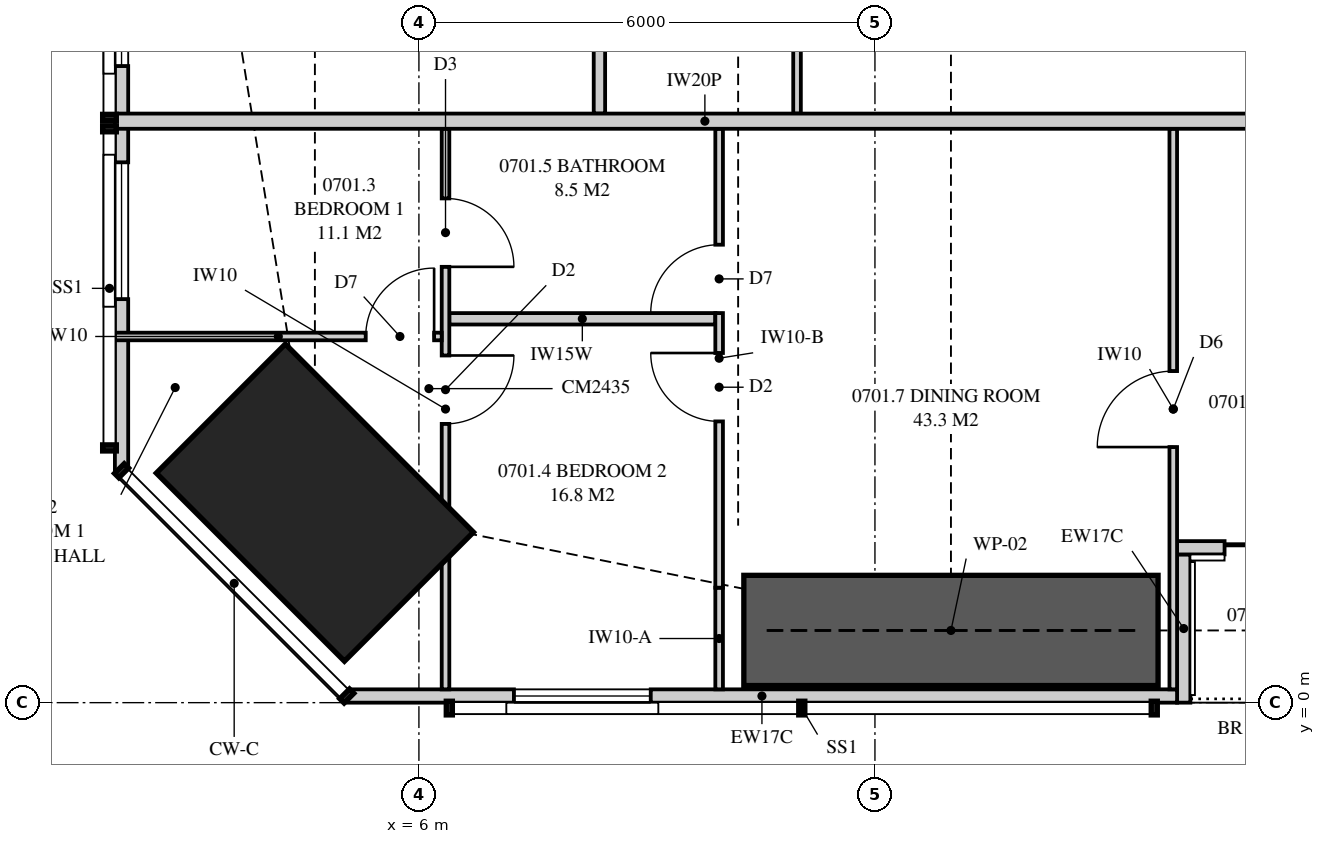
"""IFC4 building model, lengths in metres.
Left out: names, types, materials, properties, quantities, classifications, styles, units other than length and angle.
Written with IfcOpenShell. Run it as: python <this file> out.ifc"""

import sys

from ifc_helpers import new_model, si_unit, direction, frame, frame_2d, origin, origin_2d, place, context, subcontext, project, spatial, polyline, rectangle, outline, extrude, element, fill, save


model = new_model("IFC4")
c1 = context("Model", 3, precision=1e-05, world=origin(), true_north=direction((0.0, 1.0)))
c2 = subcontext(c1, "Body", "Model", "MODEL_VIEW")
j1 = project(units=[si_unit("LENGTHUNIT", "METRE"), si_unit("PLANEANGLEUNIT", "RADIAN")], contexts=[c1])
p1 = place(None, origin())
s1 = spatial("IfcSite", under=j1, at=p1, CompositionType="ELEMENT")
p2 = place(p1, origin())
s2 = spatial("IfcBuilding", under=s1, at=p2, CompositionType="ELEMENT")
p3 = place(p2, frame((0.0, 0.0, 31.05)))
s3 = spatial("IfcBuildingStorey", under=s2, at=p3, CompositionType="ELEMENT", Elevation=31.05)
p4 = place(p3, frame((4.631, 2.631, 0.0), z_axis=(0.0, 0.0, 1.0), x_axis=(0.707106781187, 0.707106781187, 0.0)))
e1 = element("IfcColumn", 1, at=p4, inside=s3, PredefinedType="COLUMN", context=c2, shape_type="SweptSolid", body=[
    extrude(rectangle(XDim=2.4, YDim=3.5, at=origin_2d()), origin(), (0.0, 0.0, 1.0), 3.35),
])
p5 = place(p3, frame((5.051, 0.087, 0.0), z_axis=(0.0, 0.0, 1.0), x_axis=(1.0, 0.0, 0.0)))
e2 = element("IfcWall", 2, at=p5, inside=s3, PredefinedType="SOLIDWALL", context=c2, shape_type="SweptSolid", body=[
    extrude(outline(polyline([(0.0, 0.0), (10.924, 0.0), (10.924, 2.15), (7.949, 2.15), (7.949, 3.11), (7.793, 3.11), (7.793, 2.15), (7.745, 2.15), (7.745, 3.11), (0.0, 3.11), (0.0, 0.0)])), frame((0.0, 0.087, 0.0), z_axis=(0.0, -1.0, 0.0), x_axis=(1.0, 0.0, 0.0)), (0.0, 0.0, 1.0), 0.175),
])
p6 = place(p5, frame((2.199, 0.0, 0.4)))
e3 = element("IfcOpeningElement", 3, at=p6, cuts=e2, PredefinedType="OPENING", context=c2, shape_type="SweptSolid", body=[
    extrude(rectangle(XDim=1.8, YDim=1.7, at=frame_2d((0.9, 0.85))), frame((0.0, 0.097, 0.0), z_axis=(0.0, -1.0, 0.0), x_axis=(1.0, 0.0, 0.0)), (0.0, 0.0, 1.0), 0.195),
])
p7 = place(p3, frame((15.975, 2.038, 0.0), z_axis=(0.0, 0.0, 1.0), x_axis=(1.0, 0.0, 0.0)))
e4 = element("IfcWall", 4, at=p7, inside=s3, PredefinedType="SOLIDWALL", context=c2, shape_type="SweptSolid", body=[
    extrude(rectangle(XDim=3.05, YDim=0.175, at=frame_2d((1.525, 0.0))), origin(), (0.0, 0.0, 1.0), 3.11),
])
p8 = place(p7, frame((0.625, 0.0, 0.0)))
e5 = element("IfcOpeningElement", 5, at=p8, cuts=e4, PredefinedType="OPENING", context=c2, shape_type="SweptSolid", body=[
    extrude(rectangle(XDim=1.8, YDim=2.1, at=frame_2d((0.9, 1.05))), frame((0.0, 0.097, 0.0), z_axis=(0.0, -1.0, 0.0), x_axis=(1.0, 0.0, 0.0)), (0.0, 0.0, 1.0), 0.195),
])
p9 = place(p3, frame((16.062, 0.0, 0.0), z_axis=(0.0, 0.0, 1.0), x_axis=(0.0, 1.0, 0.0)))
e6 = element("IfcWall", 6, at=p9, inside=s3, PredefinedType="SOLIDWALL", context=c2, shape_type="SweptSolid", body=[
    extrude(outline(polyline([(0.0, 0.0), (1.95, 0.0), (1.95, 3.11), (1.75, 3.11), (1.75, 2.15), (0.15, 2.15), (0.15, 3.11), (0.0, 3.11), (0.0, 0.0)])), frame((0.0, 0.087, 0.0), z_axis=(0.0, -1.0, 0.0), x_axis=(1.0, 0.0, 0.0)), (0.0, 0.0, 1.0), 0.175),
])
p10 = place(p3, frame((2.087, 17.333, 0.0), z_axis=(0.0, 0.0, 1.0), x_axis=(0.0, -1.0, 0.0)))
e7 = element("IfcWall", 7, at=p10, inside=s3, PredefinedType="SOLIDWALL", context=c2, shape_type="SweptSolid", body=[
    extrude(outline(polyline([(0.0, 0.0), (14.282, 0.0), (14.282, 3.11), (4.552, 3.11), (4.552, 2.15), (4.459, 2.15), (4.459, 3.11), (4.333, 3.11), (4.333, 2.15), (0.0, 2.15), (0.0, 0.0)])), frame((0.0, 0.087, 0.0), z_axis=(0.0, -1.0, 0.0), x_axis=(1.0, 0.0, 0.0)), (0.0, 0.0, 1.0), 0.175),
])
p11 = place(p10, frame((0.3, 0.0, 0.4)))
e8 = element("IfcOpeningElement", 8, at=p11, cuts=e7, PredefinedType="OPENING", context=c2, shape_type="SweptSolid", body=[
    extrude(rectangle(XDim=1.2, YDim=1.7, at=frame_2d((0.6, 0.85))), frame((0.0, 0.097, 0.0), z_axis=(0.0, -1.0, 0.0), x_axis=(1.0, 0.0, 0.0)), (0.0, 0.0, 1.0), 0.195),
])
p12 = place(p10, frame((7.158, 0.0, 0.4)))
e9 = element("IfcOpeningElement", 9, at=p12, cuts=e7, PredefinedType="OPENING", context=c2, shape_type="SweptSolid", body=[
    extrude(rectangle(XDim=1.8, YDim=1.7, at=frame_2d((0.9, 0.85))), frame((0.0, 0.097, 0.0), z_axis=(0.0, -1.0, 0.0), x_axis=(1.0, 0.0, 0.0)), (0.0, 0.0, 1.0), 0.195),
])
p13 = place(p10, frame((10.225, 0.0, 0.4)))
e10 = element("IfcOpeningElement", 10, at=p13, cuts=e7, PredefinedType="OPENING", context=c2, shape_type="SweptSolid", body=[
    extrude(rectangle(XDim=1.8, YDim=1.7, at=frame_2d((0.9, 0.85))), frame((0.0, 0.097, 0.0), z_axis=(0.0, -1.0, 0.0), x_axis=(1.0, 0.0, 0.0)), (0.0, 0.0, 1.0), 0.195),
])
p14 = place(p3, frame((6.35, 0.175, 0.0), z_axis=(0.0, 0.0, 1.0), x_axis=(0.0, 1.0, 0.0)))
e11 = element("IfcWall", 11, at=p14, inside=s3, PredefinedType="PARTITIONING", context=c2, shape_type="SweptSolid", body=[
    extrude(outline(polyline([(0.0, 0.0), (7.375, 0.0), (7.375, 3.11), (2.988, 3.11), (2.988, 2.15), (1.234, 2.15), (1.234, 3.11), (0.0, 3.11), (0.0, 0.0)])), frame((0.0, 0.05, 0.0), z_axis=(0.0, -1.0, 0.0), x_axis=(1.0, 0.0, 0.0)), (0.0, 0.0, 1.0), 0.1),
])
p15 = place(p14, frame((3.492, 0.0, 0.0)))
e12 = element("IfcOpeningElement", 12, at=p15, cuts=e11, PredefinedType="OPENING", context=c2, shape_type="SweptSolid", body=[
    extrude(rectangle(XDim=0.9, YDim=2.1, at=frame_2d((0.45, 1.05))), frame((0.0, 0.06, 0.0), z_axis=(0.0, -1.0, 0.0), x_axis=(1.0, 0.0, 0.0)), (0.0, 0.0, 1.0), 0.12),
])
p16 = place(p14, frame((5.559, 0.0, 0.0)))
e13 = element("IfcOpeningElement", 13, at=p16, cuts=e11, PredefinedType="OPENING", context=c2, shape_type="SweptSolid", body=[
    extrude(rectangle(XDim=0.9, YDim=2.1, at=frame_2d((0.45, 1.05))), frame((0.0, 0.06, 0.0), z_axis=(0.0, -1.0, 0.0), x_axis=(1.0, 0.0, 0.0)), (0.0, 0.0, 1.0), 0.12),
])
p17 = place(p3, frame((9.95, 0.175, 0.0), z_axis=(0.0, 0.0, 1.0), x_axis=(0.0, 1.0, 0.0)))
e14 = element("IfcWall", 14, at=p17, inside=s3, PredefinedType="PARTITIONING", context=c2, shape_type="SweptSolid", body=[
    extrude(outline(polyline([(0.0, 0.0), (1.338, 0.0), (1.338, 2.15), (0.51, 2.15), (0.51, 3.11), (0.0, 3.11), (0.0, 0.0)])), frame((0.0, 0.05, 0.0), z_axis=(0.0, -1.0, 0.0), x_axis=(1.0, 0.0, 0.0)), (0.0, 0.0, 1.0), 0.1),
])
p18 = place(p3, frame((9.95, 1.513, 0.0), z_axis=(0.0, 0.0, 1.0), x_axis=(0.0, 1.0, 0.0)))
e15 = element("IfcWall", 15, at=p18, inside=s3, PredefinedType="PARTITIONING", context=c2, shape_type="SweptSolid", body=[
    extrude(outline(polyline([(0.0, 0.0), (6.037, 0.0), (6.037, 2.51), (0.927, 2.51), (0.927, 2.15), (0.0, 2.15), (0.0, 0.0)])), frame((0.0, 0.05, 0.0), z_axis=(0.0, -1.0, 0.0), x_axis=(1.0, 0.0, 0.0)), (0.0, 0.0, 1.0), 0.1),
])
p19 = place(p18, frame((2.188, 0.0, 0.0)))
e16 = element("IfcOpeningElement", 16, at=p19, cuts=e15, PredefinedType="OPENING", context=c2, shape_type="SweptSolid", body=[
    extrude(rectangle(XDim=0.9, YDim=2.1, at=frame_2d((0.45, 1.05))), frame((0.0, 0.06, 0.0), z_axis=(0.0, -1.0, 0.0), x_axis=(1.0, 0.0, 0.0)), (0.0, 0.0, 1.0), 0.12),
])
p20 = place(p18, frame((3.612, 0.0, 0.0)))
e17 = element("IfcOpeningElement", 17, at=p20, cuts=e15, PredefinedType="OPENING", context=c2, shape_type="SweptSolid", body=[
    extrude(rectangle(XDim=0.9, YDim=2.1, at=frame_2d((0.45, 1.05))), frame((0.0, 0.06, 0.0), z_axis=(0.0, -1.0, 0.0), x_axis=(1.0, 0.0, 0.0)), (0.0, 0.0, 1.0), 0.12),
])
p21 = place(p3, frame((2.0, 4.817, 0.0), z_axis=(0.0, 0.0, 1.0), x_axis=(1.0, 0.0, 0.0)))
e18 = element("IfcWall", 18, at=p21, inside=s3, PredefinedType="PARTITIONING", context=c2, shape_type="SweptSolid", body=[
    extrude(outline(polyline([(0.0, 0.0), (4.3, 0.0), (4.3, 3.11), (3.148, 3.11), (3.148, 2.15), (1.406, 2.15), (1.406, 3.11), (0.0, 3.11), (0.0, 0.0)])), frame((0.0, 0.05, 0.0), z_axis=(0.0, -1.0, 0.0), x_axis=(1.0, 0.0, 0.0)), (0.0, 0.0, 1.0), 0.1),
])
p22 = place(p21, frame((3.3, 0.0, 0.0)))
e19 = element("IfcOpeningElement", 19, at=p22, cuts=e18, PredefinedType="OPENING", context=c2, shape_type="SweptSolid", body=[
    extrude(rectangle(XDim=0.9, YDim=2.1, at=frame_2d((0.45, 1.05))), frame((0.0, 0.06, 0.0), z_axis=(0.0, -1.0, 0.0), x_axis=(1.0, 0.0, 0.0)), (0.0, 0.0, 1.0), 0.12),
])
p23 = place(p3, frame((6.4, 5.05, 0.0), z_axis=(0.0, 0.0, 1.0), x_axis=(1.0, 0.0, 0.0)))
e20 = element("IfcWall", 20, at=p23, inside=s3, PredefinedType="PLUMBINGWALL", context=c2, shape_type="SweptSolid", body=[
    extrude(outline(polyline([(0.0, 0.0), (3.5, 0.0), (3.5, 3.11), (3.5, 2.51), (2.515, 2.51), (2.515, 3.11), (0.0, 3.11), (0.0, 0.0)])), frame((0.0, 0.075, 0.0), z_axis=(0.0, -1.0, 0.0), x_axis=(1.0, 0.0, 0.0)), (0.0, 0.0, 1.0), 0.15),
])
p24 = place(p3, frame((15.925, 0.175, 0.0), z_axis=(0.0, 0.0, 1.0), x_axis=(0.0, 1.0, 0.0)))
e21 = element("IfcWall", 21, at=p24, inside=s3, PredefinedType="PARTITIONING", context=c2, shape_type="SweptSolid", body=[
    extrude(outline(polyline([(0.0, 0.0), (7.375, 0.0), (7.375, 3.11), (1.635, 3.11), (1.635, 2.15), (0.0, 2.15), (0.0, 3.11), (0.0, 0.0)])), frame((0.0, 0.05, 0.0), z_axis=(0.0, -1.0, 0.0), x_axis=(1.0, 0.0, 0.0)), (0.0, 0.0, 1.0), 0.1),
])
p25 = place(p24, frame((3.188, 0.0, 0.0)))
e22 = element("IfcOpeningElement", 22, at=p25, cuts=e21, PredefinedType="OPENING", context=c2, shape_type="SweptSolid", body=[
    extrude(rectangle(XDim=1.0, YDim=2.1, at=frame_2d((0.5, 1.05))), frame((0.0, 0.06, 0.0), z_axis=(0.0, -1.0, 0.0), x_axis=(1.0, 0.0, 0.0)), (0.0, 0.0, 1.0), 0.12),
])
p26 = place(p3, frame((2.0, 7.65, 0.0), z_axis=(0.0, 0.0, 1.0), x_axis=(1.0, 0.0, 0.0)))
e23 = element("IfcWall", 23, at=p26, inside=s3, PredefinedType="PARTITIONING", context=c2, shape_type="SweptSolid", body=[
    extrude(outline(polyline([(0.0, 0.0), (15.525, 0.0), (15.525, 3.11), (11.337, 3.11), (11.337, 2.541), (10.663, 2.541), (10.663, 3.11), (9.51, 3.11), (9.51, 2.51), (6.89, 2.51), (6.89, 3.11), (2.969, 3.11), (2.969, 2.541), (2.74, 2.541), (2.74, 2.15), (0.896, 2.15), (0.896, 3.11), (0.0, 3.11), (0.0, 0.0)])), frame((0.0, 0.1, 0.0), z_axis=(0.0, -1.0, 0.0), x_axis=(1.0, 0.0, 0.0)), (0.0, 0.0, 1.0), 0.2),
])
p27 = place(p3, frame((8.375, 7.75, 0.0), z_axis=(0.0, 0.0, 1.0), x_axis=(0.0, 1.0, 0.0)))
e24 = element("IfcWall", 24, at=p27, inside=s3, PredefinedType="PLUMBINGWALL", context=c2, shape_type="SweptSolid", body=[
    extrude(rectangle(XDim=3.45, YDim=0.15, at=frame_2d((1.725, 0.0))), origin(), (0.0, 0.0, 1.0), 3.11),
])
p28 = place(p3, frame((10.975, 7.75, 0.0), z_axis=(0.0, 0.0, 1.0), x_axis=(0.0, 1.0, 0.0)))
e25 = element("IfcWall", 25, at=p28, inside=s3, PredefinedType="PARTITIONING", context=c2, shape_type="SweptSolid", body=[
    extrude(outline(polyline([(0.0, 0.0), (3.45, 0.0), (3.45, 3.11), (3.45, 2.51), (0.0, 2.51), (0.0, 3.11), (0.0, 0.0)])), frame((0.0, 0.05, 0.0), z_axis=(0.0, -1.0, 0.0), x_axis=(1.0, 0.0, 0.0)), (0.0, 0.0, 1.0), 0.1),
])
p29 = place(p3, frame((10.275, 0.95, 0.0), z_axis=(0.0, 0.0, 1.0), x_axis=(1.0, 0.0, 0.0)))
e26 = element("IfcWall", 26, at=p29, inside=s3, PredefinedType="SHEAR", context=c2, shape_type="SweptSolid", body=[
    extrude(rectangle(XDim=5.45, YDim=1.45, at=frame_2d((2.725, 0.0))), origin(), (0.0, 0.0, 1.0), 3.35),
])
p30 = place(p6, origin())
e27 = element("IfcWindow", 27, at=p30, inside=s3, PartitioningType="SINGLE_PANEL", PredefinedType="WINDOW", context=c2, shape_type="SweptSolid", body=[
    extrude(rectangle(XDim=1.8, YDim=1.7, at=frame_2d((0.9, 0.85))), frame((0.0, 0.03, 0.0), z_axis=(0.0, -1.0, 0.0), x_axis=(1.0, 0.0, 0.0)), (0.0, 0.0, 1.0), 0.06),
])
fill(e3, e27)
p31 = place(p8, origin())
e28 = element("IfcDoor", 28, at=p31, inside=s3, OperationType="SLIDING_TO_LEFT", PredefinedType="DOOR", context=c2, shape_type="SweptSolid", body=[
    extrude(rectangle(XDim=1.8, YDim=2.1, at=frame_2d((0.9, 1.05))), frame((0.0, 0.025, 0.0), z_axis=(0.0, -1.0, 0.0), x_axis=(1.0, 0.0, 0.0)), (0.0, 0.0, 1.0), 0.05),
])
fill(e5, e28)
p32 = place(p12, origin())
e29 = element("IfcWindow", 29, at=p32, inside=s3, PartitioningType="SINGLE_PANEL", PredefinedType="WINDOW", context=c2, shape_type="SweptSolid", body=[
    extrude(rectangle(XDim=1.8, YDim=1.7, at=frame_2d((0.9, 0.85))), frame((0.0, 0.03, 0.0), z_axis=(0.0, -1.0, 0.0), x_axis=(1.0, 0.0, 0.0)), (0.0, 0.0, 1.0), 0.06),
])
fill(e9, e29)
p33 = place(p13, origin())
e30 = element("IfcWindow", 30, at=p33, inside=s3, PartitioningType="SINGLE_PANEL", PredefinedType="WINDOW", context=c2, shape_type="SweptSolid", body=[
    extrude(rectangle(XDim=1.8, YDim=1.7, at=frame_2d((0.9, 0.85))), frame((0.0, 0.03, 0.0), z_axis=(0.0, -1.0, 0.0), x_axis=(1.0, 0.0, 0.0)), (0.0, 0.0, 1.0), 0.06),
])
fill(e10, e30)
p34 = place(p22, origin())
e31 = element("IfcDoor", 31, at=p34, inside=s3, OperationType="SINGLE_SWING_RIGHT", PredefinedType="DOOR", context=c2, shape_type="SweptSolid", body=[
    extrude(rectangle(XDim=0.9, YDim=2.1, at=frame_2d((0.45, 1.05))), frame((0.0, 0.025, 0.0), z_axis=(0.0, -1.0, 0.0), x_axis=(1.0, 0.0, 0.0)), (0.0, 0.0, 1.0), 0.05),
])
fill(e19, e31)
p35 = place(p15, frame((0.9, 0.0, 0.0), z_axis=(0.0, 0.0, 1.0), x_axis=(-1.0, 0.0, 0.0)))
e32 = element("IfcDoor", 32, at=p35, inside=s3, OperationType="SINGLE_SWING_LEFT", PredefinedType="DOOR", context=c2, shape_type="SweptSolid", body=[
    extrude(rectangle(XDim=0.9, YDim=2.1, at=frame_2d((0.45, 1.05))), frame((0.0, 0.025, 0.0), z_axis=(0.0, -1.0, 0.0), x_axis=(1.0, 0.0, 0.0)), (0.0, 0.0, 1.0), 0.05),
])
fill(e12, e32)
p36 = place(p19, origin())
e33 = element("IfcDoor", 33, at=p36, inside=s3, OperationType="SINGLE_SWING_RIGHT", PredefinedType="DOOR", context=c2, shape_type="SweptSolid", body=[
    extrude(rectangle(XDim=0.9, YDim=2.1, at=frame_2d((0.45, 1.05))), frame((0.0, 0.025, 0.0), z_axis=(0.0, -1.0, 0.0), x_axis=(1.0, 0.0, 0.0)), (0.0, 0.0, 1.0), 0.05),
])
fill(e16, e33)
p37 = place(p20, origin())
e34 = element("IfcDoor", 34, at=p37, inside=s3, OperationType="SINGLE_SWING_LEFT", PredefinedType="DOOR", context=c2, shape_type="SweptSolid", body=[
    extrude(rectangle(XDim=0.9, YDim=2.1, at=frame_2d((0.45, 1.05))), frame((0.0, 0.025, 0.0), z_axis=(0.0, -1.0, 0.0), x_axis=(1.0, 0.0, 0.0)), (0.0, 0.0, 1.0), 0.05),
])
fill(e17, e34)
p38 = place(p16, frame((0.9, 0.0, 0.0), z_axis=(0.0, 0.0, 1.0), x_axis=(-1.0, 0.0, 0.0)))
e35 = element("IfcDoor", 35, at=p38, inside=s3, OperationType="SINGLE_SWING_RIGHT", PredefinedType="DOOR", context=c2, shape_type="SweptSolid", body=[
    extrude(rectangle(XDim=0.9, YDim=2.1, at=frame_2d((0.45, 1.05))), frame((0.0, 0.025, 0.0), z_axis=(0.0, -1.0, 0.0), x_axis=(1.0, 0.0, 0.0)), (0.0, 0.0, 1.0), 0.05),
])
fill(e13, e35)
p39 = place(p25, origin())
e36 = element("IfcDoor", 36, at=p39, inside=s3, OperationType="SINGLE_SWING_LEFT", PredefinedType="DOOR", context=c2, shape_type="SweptSolid", body=[
    extrude(rectangle(XDim=1.0, YDim=2.1, at=frame_2d((0.5, 1.05))), frame((0.0, 0.025, 0.0), z_axis=(0.0, -1.0, 0.0), x_axis=(1.0, 0.0, 0.0)), (0.0, 0.0, 1.0), 0.05),
])
fill(e22, e36)
save(model, sys.argv[1])
